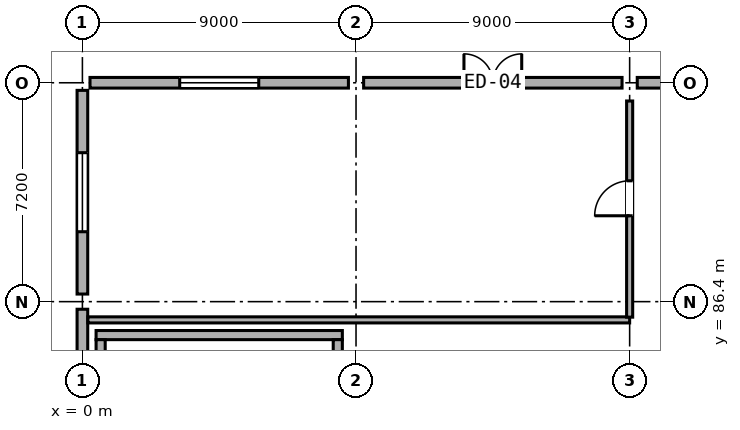
"""IFC4 building model, lengths in metres.
Left out: names, types, materials, properties, quantities, classifications, styles, units other than length and angle.
Written with IfcOpenShell. Run it as: python <this file> out.ifc"""

import sys

from ifc_helpers import new_model, si_unit, direction, frame, frame_2d, origin, origin_2d, place, context, subcontext, project, spatial, rectangle, hollow_rectangle, extrude, element, fill, save


model = new_model("IFC4")
c1 = context("Model", 3, precision=1e-05, world=origin(), true_north=direction((0.0, 1.0)))
c2 = subcontext(c1, "Body", "Model", "MODEL_VIEW")
j1 = project(units=[si_unit("LENGTHUNIT", "METRE"), si_unit("PLANEANGLEUNIT", "RADIAN")], contexts=[c1])
p1 = place(None, origin())
s1 = spatial("IfcSite", under=j1, at=p1, CompositionType="ELEMENT")
p2 = place(p1, origin())
s2 = spatial("IfcBuilding", under=s1, at=p2, CompositionType="ELEMENT")
p3 = place(p2, origin())
s3 = spatial("IfcBuildingStorey", under=s2, at=p3, CompositionType="ELEMENT", Elevation=0.0)
for number, where, z_axis, x_axis in (
    (1, (0.0, 86.4, 0.0), (0.0, 0.0, 1.0), (1.0, 0.0, 0.0)),
    (2, (0.0, 93.6, 0.0), (0.0, 0.0, 1.0), (1.0, 0.0, 0.0)),
):
    element("IfcColumn", number, at=place(p3, frame(where, z_axis=z_axis, x_axis=x_axis)), inside=s3, PredefinedType="COLUMN", context=c2, shape_type="SweptSolid", body=[
        extrude(hollow_rectangle(XDim=0.5, YDim=0.5, WallThickness=0.022, at=origin_2d()), origin(), (0.0, 0.0, 1.0), 4.8),
    ])
p4 = place(p3, frame((9.0, 86.4, 0.0), z_axis=(0.0, 0.0, 1.0), x_axis=(1.0, 0.0, 0.0)))
e3 = element("IfcColumn", 3, at=p4, inside=s3, PredefinedType="COLUMN", context=c2, shape_type="SweptSolid", body=[
    extrude(hollow_rectangle(XDim=0.65, YDim=0.65, WallThickness=0.025, at=origin_2d()), origin(), (0.0, 0.0, 1.0), 4.8),
])
p5 = place(p3, frame((9.0, 93.6, 0.0), z_axis=(0.0, 0.0, 1.0), x_axis=(1.0, 0.0, 0.0)))
e4 = element("IfcColumn", 4, at=p5, inside=s3, PredefinedType="COLUMN", context=c2, shape_type="SweptSolid", body=[
    extrude(hollow_rectangle(XDim=0.5, YDim=0.5, WallThickness=0.022, at=origin_2d()), origin(), (0.0, 0.0, 1.0), 4.8),
])
p6 = place(p3, frame((18.0, 86.4, 0.0), z_axis=(0.0, 0.0, 1.0), x_axis=(1.0, 0.0, 0.0)))
e5 = element("IfcColumn", 5, at=p6, inside=s3, PredefinedType="COLUMN", context=c2, shape_type="SweptSolid", body=[
    extrude(hollow_rectangle(XDim=0.65, YDim=0.65, WallThickness=0.025, at=origin_2d()), origin(), (0.0, 0.0, 1.0), 4.8),
])
p7 = place(p3, frame((18.0, 93.6, 0.0), z_axis=(0.0, 0.0, 1.0), x_axis=(1.0, 0.0, 0.0)))
e6 = element("IfcColumn", 6, at=p7, inside=s3, PredefinedType="COLUMN", context=c2, shape_type="SweptSolid", body=[
    extrude(hollow_rectangle(XDim=0.5, YDim=0.5, WallThickness=0.022, at=origin_2d()), origin(), (0.0, 0.0, 1.0), 4.8),
])
p8 = place(p3, frame((8.75, 93.6, 0.0), z_axis=(0.0, 0.0, 1.0), x_axis=(-1.0, 0.0, 0.0)))
e7 = element("IfcWall", 7, at=p8, inside=s3, PredefinedType="STANDARD", context=c2, shape_type="SweptSolid", body=[
    extrude(rectangle(XDim=8.5, YDim=0.35, at=frame_2d((4.25, 0.0))), origin(), (0.0, 0.0, 1.0), 4.055),
])
p9 = place(p8, frame((2.95, 0.0, 0.85)))
e8 = element("IfcOpeningElement", 8, at=p9, cuts=e7, PredefinedType="OPENING", context=c2, shape_type="SweptSolid", body=[
    extrude(rectangle(XDim=2.6, YDim=1.6, at=frame_2d((1.3, 0.8))), frame((0.0, 0.187, 0.0), z_axis=(0.0, -1.0, 0.0), x_axis=(1.0, 0.0, 0.0)), (0.0, 0.0, 1.0), 0.374),
])
p10 = place(p3, frame((17.75, 93.6, 0.0), z_axis=(0.0, 0.0, 1.0), x_axis=(-1.0, 0.0, 0.0)))
e9 = element("IfcWall", 9, at=p10, inside=s3, PredefinedType="STANDARD", context=c2, shape_type="SweptSolid", body=[
    extrude(rectangle(XDim=8.5, YDim=0.35, at=frame_2d((4.25, 0.0))), origin(), (0.0, 0.0, 1.0), 4.055),
])
p11 = place(p10, frame((3.3, 0.0, 0.0)))
e10 = element("IfcOpeningElement", 10, at=p11, cuts=e9, PredefinedType="OPENING", context=c2, shape_type="SweptSolid", body=[
    extrude(rectangle(XDim=1.9, YDim=2.4, at=frame_2d((0.95, 1.2))), frame((0.0, 0.187, 0.0), z_axis=(0.0, -1.0, 0.0), x_axis=(1.0, 0.0, 0.0)), (0.0, 0.0, 1.0), 0.374),
])
p12 = place(p3, frame((26.75, 93.6, 0.0), z_axis=(0.0, 0.0, 1.0), x_axis=(-1.0, 0.0, 0.0)))
e11 = element("IfcWall", 11, at=p12, inside=s3, PredefinedType="STANDARD", context=c2, shape_type="SweptSolid", body=[
    extrude(rectangle(XDim=8.5, YDim=0.35, at=frame_2d((4.25, 0.0))), origin(), (0.0, 0.0, 1.0), 4.055),
])
p13 = place(p12, frame((2.95, 0.0, 0.85)))
e12 = element("IfcOpeningElement", 12, at=p13, cuts=e11, PredefinedType="OPENING", context=c2, shape_type="SweptSolid", body=[
    extrude(rectangle(XDim=2.6, YDim=1.6, at=frame_2d((1.3, 0.8))), frame((0.0, 0.187, 0.0), z_axis=(0.0, -1.0, 0.0), x_axis=(1.0, 0.0, 0.0)), (0.0, 0.0, 1.0), 0.374),
])
p14 = place(p3, frame((0.0, 79.45, 0.0), z_axis=(0.0, 0.0, 1.0), x_axis=(0.0, 1.0, 0.0)))
e13 = element("IfcWall", 13, at=p14, inside=s3, PredefinedType="STANDARD", context=c2, shape_type="SweptSolid", body=[
    extrude(rectangle(XDim=6.7, YDim=0.35, at=frame_2d((3.35, 0.0))), origin(), (0.0, 0.0, 1.0), 4.055),
])
p15 = place(p3, frame((0.0, 86.65, 0.0), z_axis=(0.0, 0.0, 1.0), x_axis=(0.0, 1.0, 0.0)))
e14 = element("IfcWall", 14, at=p15, inside=s3, PredefinedType="STANDARD", context=c2, shape_type="SweptSolid", body=[
    extrude(rectangle(XDim=6.7, YDim=0.35, at=frame_2d((3.35, 0.0))), origin(), (0.0, 0.0, 1.0), 4.055),
])
p16 = place(p15, frame((2.05, 0.0, 0.85)))
e15 = element("IfcOpeningElement", 15, at=p16, cuts=e14, PredefinedType="OPENING", context=c2, shape_type="SweptSolid", body=[
    extrude(rectangle(XDim=2.6, YDim=1.6, at=frame_2d((1.3, 0.8))), frame((0.0, 0.187, 0.0), z_axis=(0.0, -1.0, 0.0), x_axis=(1.0, 0.0, 0.0)), (0.0, 0.0, 1.0), 0.374),
])
p17 = place(p3, frame((0.45, 85.3, 0.0), z_axis=(0.0, 0.0, 1.0), x_axis=(1.0, 0.0, 0.0)))
e16 = element("IfcWall", 16, at=p17, inside=s3, PredefinedType="SHEAR", context=c2, shape_type="SweptSolid", body=[
    extrude(rectangle(XDim=8.1, YDim=0.3, at=frame_2d((4.05, 0.0))), origin(), (0.0, 0.0, 1.0), 4.555),
])
for number, where, z_axis, x_axis in (
    (17, (0.6, 81.35, 0.0), (0.0, 0.0, 1.0), (0.0, 1.0, 0.0)),
    (18, (8.4, 81.35, 0.0), (0.0, 0.0, 1.0), (0.0, 1.0, 0.0)),
):
    element("IfcWall", number, at=place(p3, frame(where, z_axis=z_axis, x_axis=x_axis)), inside=s3, PredefinedType="SHEAR", context=c2, shape_type="SweptSolid", body=[
        extrude(rectangle(XDim=3.8, YDim=0.3, at=frame_2d((1.9, 0.0))), origin(), (0.0, 0.0, 1.0), 4.555),
    ])
p18 = place(p3, frame((0.18, 85.8, 0.0), z_axis=(0.0, 0.0, 1.0), x_axis=(1.0, 0.0, 0.0)))
e19 = element("IfcWall", 19, at=p18, inside=s3, PredefinedType="PARTITIONING", context=c2, shape_type="SweptSolid", body=[
    extrude(rectangle(XDim=17.82, YDim=0.2, at=frame_2d((8.91, 0.0))), origin(), (0.0, 0.0, 1.0), 4.555),
])
p19 = place(p3, frame((18.0, 85.89, 0.0), z_axis=(0.0, 0.0, 1.0), x_axis=(0.0, 1.0, 0.0)))
e20 = element("IfcWall", 20, at=p19, inside=s3, PredefinedType="PARTITIONING", context=c2, shape_type="SweptSolid", body=[
    extrude(rectangle(XDim=7.11, YDim=0.2, at=frame_2d((3.555, 0.0))), origin(), (0.0, 0.0, 1.0), 3.835),
])
p20 = place(p19, frame((3.335, 0.0, 0.0)))
e21 = element("IfcOpeningElement", 21, at=p20, cuts=e20, PredefinedType="OPENING", context=c2, shape_type="SweptSolid", body=[
    extrude(rectangle(XDim=1.15, YDim=2.1, at=frame_2d((0.575, 1.05))), frame((0.0, 0.112, 0.0), z_axis=(0.0, -1.0, 0.0), x_axis=(1.0, 0.0, 0.0)), (0.0, 0.0, 1.0), 0.224),
])
p21 = place(p9, origin())
e22 = element("IfcWindow", 22, at=p21, inside=s3, PartitioningType="DOUBLE_PANEL_VERTICAL", PredefinedType="WINDOW", context=c2, shape_type="SweptSolid", body=[
    extrude(rectangle(XDim=2.6, YDim=1.6, at=frame_2d((1.3, 0.8))), frame((0.0, 0.03, 0.0), z_axis=(0.0, -1.0, 0.0), x_axis=(1.0, 0.0, 0.0)), (0.0, 0.0, 1.0), 0.06),
])
fill(e8, e22)
p22 = place(p11, frame((1.9, 0.0, 0.0), z_axis=(0.0, 0.0, 1.0), x_axis=(-1.0, 0.0, 0.0)))
e23 = element("IfcDoor", 23, at=p22, inside=s3, OperationType="DOUBLE_DOOR_SINGLE_SWING", PredefinedType="DOOR", context=c2, shape_type="SweptSolid", body=[
    extrude(rectangle(XDim=1.9, YDim=2.4, at=frame_2d((0.95, 1.2))), frame((0.0, 0.025, 0.0), z_axis=(0.0, -1.0, 0.0), x_axis=(1.0, 0.0, 0.0)), (0.0, 0.0, 1.0), 0.05),
])
fill(e10, e23)
p23 = place(p16, origin())
e24 = element("IfcWindow", 24, at=p23, inside=s3, PartitioningType="DOUBLE_PANEL_VERTICAL", PredefinedType="WINDOW", context=c2, shape_type="SweptSolid", body=[
    extrude(rectangle(XDim=2.6, YDim=1.6, at=frame_2d((1.3, 0.8))), frame((0.0, 0.03, 0.0), z_axis=(0.0, -1.0, 0.0), x_axis=(1.0, 0.0, 0.0)), (0.0, 0.0, 1.0), 0.06),
])
fill(e15, e24)
p24 = place(p20, origin())
e25 = element("IfcDoor", 25, at=p24, inside=s3, OperationType="SINGLE_SWING_LEFT", PredefinedType="DOOR", context=c2, shape_type="SweptSolid", body=[
    extrude(rectangle(XDim=1.15, YDim=2.1, at=frame_2d((0.575, 1.05))), frame((0.0, 0.025, 0.0), z_axis=(0.0, -1.0, 0.0), x_axis=(1.0, 0.0, 0.0)), (0.0, 0.0, 1.0), 0.05),
])
fill(e21, e25)
save(model, sys.argv[1])
